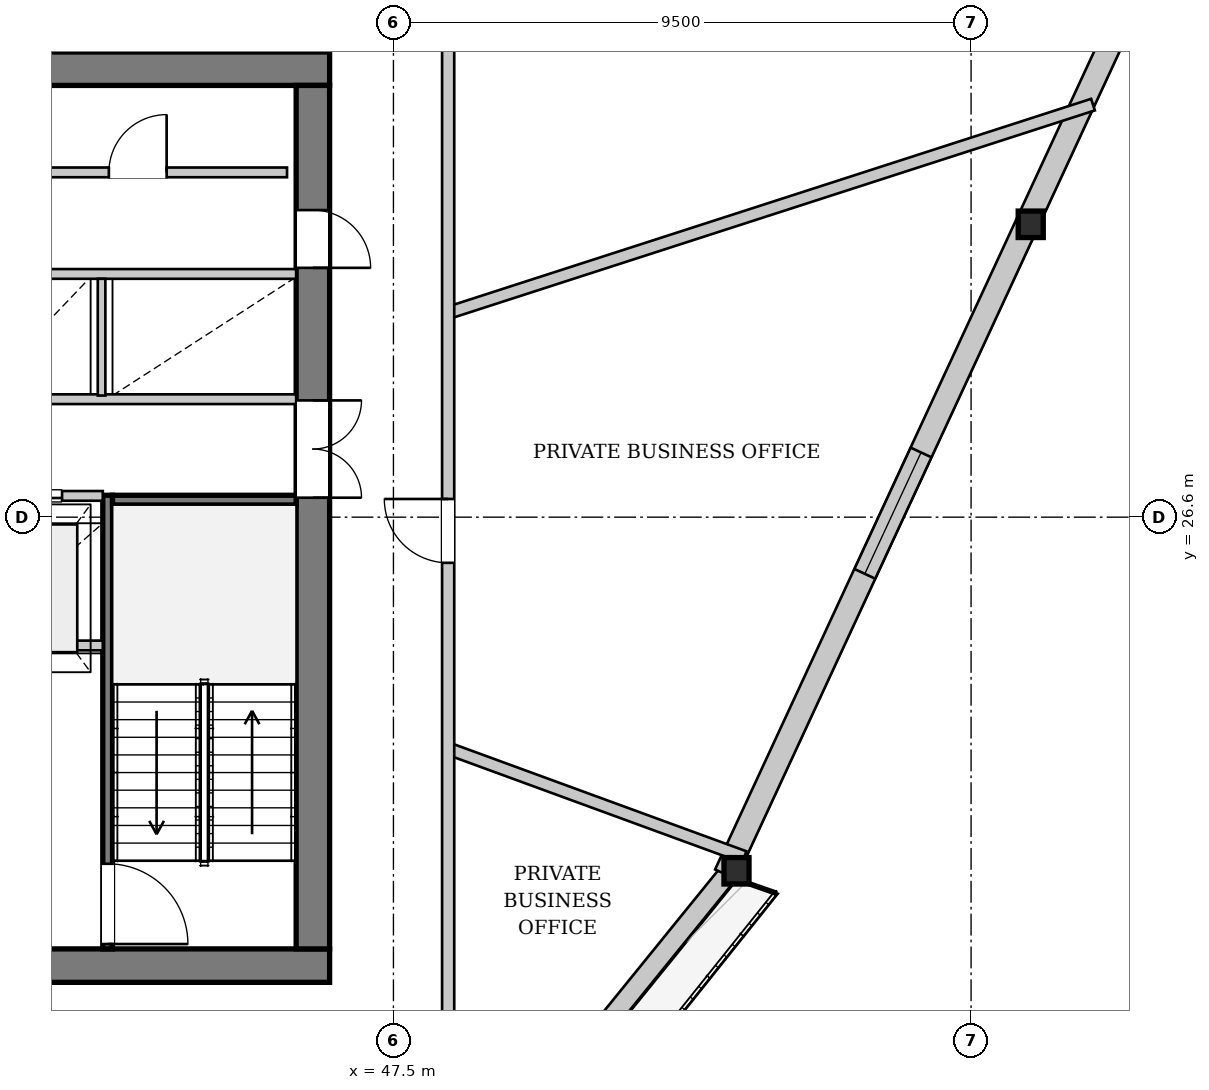
"""IFC4 building model, lengths in metres.
Left out: names, types, materials, properties, quantities, classifications, styles, units other than length and angle.
Written with IfcOpenShell. Run it as: python <this file> out.ifc"""

import sys

from ifc_helpers import new_model, si_unit, direction, frame, frame_2d, origin, origin_2d, place, context, subcontext, project, spatial, rectangle, i_section, extrude, source, transform, mapped, element, fill, save


model = new_model("IFC4")
c1 = context("Model", 3, precision=1e-05, world=origin(), true_north=direction((0.0, 1.0)))
c2 = subcontext(c1, "Body", "Model", "MODEL_VIEW")
j1 = project(units=[si_unit("LENGTHUNIT", "METRE"), si_unit("PLANEANGLEUNIT", "RADIAN")], contexts=[c1])
p1 = place(None, origin())
s1 = spatial("IfcSite", under=j1, at=p1, CompositionType="ELEMENT")
p2 = place(p1, origin())
s2 = spatial("IfcBuilding", under=s1, at=p2, CompositionType="ELEMENT")
p3 = place(p2, frame((0.0, 0.0, 175.0)))
s3 = spatial("IfcBuildingStorey", under=s2, at=p3, CompositionType="ELEMENT", Elevation=175.0)
m1 = source(origin(), c2, "Body", "SweptSolid", [
    extrude(i_section(OverallWidth=0.412, OverallDepth=0.435, WebThickness=0.031, FlangeThickness=0.05, at=origin_2d()), origin(), (0.0, 0.0, 1.0), 3.396),
])
p4 = place(p3, frame((53.135, 20.647, 0.0), z_axis=(0.00424121851, 0.081230117231, 0.996686349922), x_axis=(-0.998639713808, 0.052141365588, 0.0)))
e1 = element("IfcColumn", 1, at=p4, inside=s3, PredefinedType="COLUMN", context=c2, shape_type="MappedRepresentation", body=[
    mapped(m1, transform((0.0, 0.0, 0.0), x_axis=(1.0, 0.0, 0.0), y_axis=(0.0, 1.0, 0.0), z_axis=(0.0, 0.0, 1.0), scale=1.0)),
])
m2 = source(origin(), c2, "Body", "SweptSolid", [
    extrude(i_section(OverallWidth=0.412, OverallDepth=0.435, WebThickness=0.031, FlangeThickness=0.05, at=origin_2d()), origin(), (0.0, 0.0, 1.0), 3.404),
])
p5 = place(p3, frame((58.05, 31.252, 0.0), z_axis=(-0.0404553248, 0.096332448948, 0.994526734671), x_axis=(-0.92199681109, -0.387197469438, 0.0)))
e2 = element("IfcColumn", 2, at=p5, inside=s3, PredefinedType="COLUMN", context=c2, shape_type="MappedRepresentation", body=[
    mapped(m2, transform((0.0, 0.0, 0.0), x_axis=(1.0, 0.0, 0.0), y_axis=(0.0, 1.0, 0.0), z_axis=(0.0, 0.0, 1.0), scale=1.0)),
])
p6 = place(p3, frame((53.01, 20.748, 0.0), z_axis=(0.0, 0.0, 1.0), x_axis=(-0.629806386055, -0.776752158725, 0.0)))
e3 = element("IfcWall", 3, at=p6, inside=s3, PredefinedType="SOLIDWALL", context=c2, shape_type="SweptSolid", body=[
    extrude(rectangle(XDim=23.378, YDim=0.32, at=frame_2d((11.689, 0.0))), origin(), (0.0, 0.0, 1.0), 2.722),
])
p7 = place(p6, frame((6.731, 0.0, 0.0)))
e4 = element("IfcOpeningElement", 4, at=p7, cuts=e3, PredefinedType="OPENING", context=c2, shape_type="SweptSolid", body=[
    extrude(rectangle(XDim=1.5, YDim=2.3, at=frame_2d((0.75, 1.15))), frame((0.0, 0.17, 0.0), z_axis=(0.0, -1.0, 0.0), x_axis=(1.0, 0.0, 0.0)), (0.0, 0.0, 1.0), 0.34),
])
p8 = place(p6, frame((16.0, 0.0, 0.252)))
e5 = element("IfcOpeningElement", 5, at=p8, cuts=e3, PredefinedType="OPENING", context=c2, shape_type="SweptSolid", body=[
    extrude(rectangle(XDim=2.6, YDim=2.35, at=frame_2d((1.3, 1.175))), frame((0.0, 0.17, 0.0), z_axis=(0.0, -1.0, 0.0), x_axis=(1.0, 0.0, 0.0)), (0.0, 0.0, 1.0), 0.34),
])
p9 = place(p3, frame((62.792, 41.938, 0.0), z_axis=(0.0, 0.0, 1.0), x_axis=(-0.420482819505, -0.907300500662, 0.0)))
e6 = element("IfcWall", 6, at=p9, inside=s3, PredefinedType="SOLIDWALL", context=c2, shape_type="SweptSolid", body=[
    extrude(rectangle(XDim=23.378, YDim=0.38, at=frame_2d((11.689, 0.0))), origin(), (0.0, 0.0, 1.0), 2.722),
])
p10 = place(p9, frame((5.446, 0.0, 0.352)))
e7 = element("IfcOpeningElement", 7, at=p10, cuts=e6, PredefinedType="OPENING", context=c2, shape_type="SweptSolid", body=[
    extrude(rectangle(XDim=2.2, YDim=2.25, at=frame_2d((1.1, 1.125))), frame((0.0, 0.2, 0.0), z_axis=(0.0, -1.0, 0.0), x_axis=(1.0, 0.0, 0.0)), (0.0, 0.0, 1.0), 0.4),
])
p11 = place(p9, frame((15.732, 0.0, 0.352)))
e8 = element("IfcOpeningElement", 8, at=p11, cuts=e6, PredefinedType="OPENING", context=c2, shape_type="SweptSolid", body=[
    extrude(rectangle(XDim=2.2, YDim=2.25, at=frame_2d((1.1, 1.125))), frame((0.0, 0.2, 0.0), z_axis=(0.0, -1.0, 0.0), x_axis=(1.0, 0.0, 0.0)), (0.0, 0.0, 1.0), 0.4),
])
p12 = place(p3, frame((46.45, 19.225, 0.0), z_axis=(0.0, 0.0, 1.0), x_axis=(-1.0, 0.0, 0.0)))
e9 = element("IfcWall", 9, at=p12, inside=s3, PredefinedType="SHEAR", context=c2, shape_type="SweptSolid", body=[
    extrude(rectangle(XDim=16.9, YDim=0.55, at=frame_2d((8.45, 0.0))), origin(), (0.0, 0.0, 1.0), 3.33),
])
p13 = place(p12, frame((4.65, 0.0, 0.0)))
e10 = element("IfcOpeningElement", 10, at=p13, cuts=e9, PredefinedType="OPENING", context=c2, shape_type="SweptSolid", body=[
    extrude(rectangle(XDim=1.12, YDim=2.25, at=frame_2d((0.56, 1.125))), frame((0.0, 0.285, 0.0), z_axis=(0.0, -1.0, 0.0), x_axis=(1.0, 0.0, 0.0)), (0.0, 0.0, 1.0), 0.57),
])
p14 = place(p12, frame((11.15, 0.0, 0.0)))
e11 = element("IfcOpeningElement", 11, at=p14, cuts=e9, PredefinedType="OPENING", context=c2, shape_type="SweptSolid", body=[
    extrude(rectangle(XDim=1.12, YDim=2.25, at=frame_2d((0.56, 1.125))), frame((0.0, 0.285, 0.0), z_axis=(0.0, -1.0, 0.0), x_axis=(1.0, 0.0, 0.0)), (0.0, 0.0, 1.0), 0.57),
])
p15 = place(p3, frame((29.55, 33.975, 0.0), z_axis=(0.0, 0.0, 1.0), x_axis=(1.0, 0.0, 0.0)))
e12 = element("IfcWall", 12, at=p15, inside=s3, PredefinedType="SHEAR", context=c2, shape_type="SweptSolid", body=[
    extrude(rectangle(XDim=16.9, YDim=0.55, at=frame_2d((8.45, 0.0))), origin(), (0.0, 0.0, 1.0), 3.33),
])
p16 = place(p15, frame((1.55, 0.0, 0.0)))
e13 = element("IfcOpeningElement", 13, at=p16, cuts=e12, PredefinedType="OPENING", context=c2, shape_type="SweptSolid", body=[
    extrude(rectangle(XDim=0.95, YDim=2.1, at=frame_2d((0.475, 1.05))), frame((0.0, 0.285, 0.0), z_axis=(0.0, -1.0, 0.0), x_axis=(1.0, 0.0, 0.0)), (0.0, 0.0, 1.0), 0.57),
])
p17 = place(p15, frame((3.93, 0.0, 0.0)))
e14 = element("IfcOpeningElement", 14, at=p17, cuts=e12, PredefinedType="OPENING", context=c2, shape_type="SweptSolid", body=[
    extrude(rectangle(XDim=1.32, YDim=2.2, at=frame_2d((0.66, 1.1))), frame((0.0, 0.285, 0.0), z_axis=(0.0, -1.0, 0.0), x_axis=(1.0, 0.0, 0.0)), (0.0, 0.0, 1.0), 0.57),
])
p18 = place(p3, frame((46.175, 33.7, 0.0), z_axis=(0.0, 0.0, 1.0), x_axis=(0.0, -1.0, 0.0)))
e15 = element("IfcWall", 15, at=p18, inside=s3, PredefinedType="SHEAR", context=c2, shape_type="SweptSolid", body=[
    extrude(rectangle(XDim=14.2, YDim=0.55, at=frame_2d((7.1, 0.0))), origin(), (0.0, 0.0, 1.0), 3.33),
])
p19 = place(p18, frame((5.18, 0.0, 0.0)))
e16 = element("IfcOpeningElement", 16, at=p19, cuts=e15, PredefinedType="OPENING", context=c2, shape_type="SweptSolid", body=[
    extrude(rectangle(XDim=1.6, YDim=2.2, at=frame_2d((0.8, 1.1))), frame((0.0, 0.285, 0.0), z_axis=(0.0, -1.0, 0.0), x_axis=(1.0, 0.0, 0.0)), (0.0, 0.0, 1.0), 0.57),
])
p20 = place(p18, frame((2.05, 0.0, 0.0)))
e17 = element("IfcOpeningElement", 17, at=p20, cuts=e15, PredefinedType="OPENING", context=c2, shape_type="SweptSolid", body=[
    extrude(rectangle(XDim=0.95, YDim=2.1, at=frame_2d((0.475, 1.05))), frame((0.0, 0.285, 0.0), z_axis=(0.0, -1.0, 0.0), x_axis=(1.0, 0.0, 0.0)), (0.0, 0.0, 1.0), 0.57),
])
p21 = place(p3, frame((42.8, 26.96, 0.0), z_axis=(0.0, 0.0, 1.0), x_axis=(0.0, -1.0, 0.0)))
e18 = element("IfcWall", 18, at=p21, inside=s3, PredefinedType="PARTITIONING", context=c2, shape_type="SweptSolid", body=[
    extrude(rectangle(XDim=7.46, YDim=0.16, at=frame_2d((3.73, 0.0))), origin(), (0.0, 0.0, 1.0), 3.33),
])
p22 = place(p21, frame((6.06, 0.0, 0.0)))
e19 = element("IfcOpeningElement", 19, at=p22, cuts=e18, PredefinedType="OPENING", context=c2, shape_type="SweptSolid", body=[
    extrude(rectangle(XDim=1.32, YDim=2.2, at=frame_2d((0.66, 1.1))), frame((0.0, 0.09, 0.0), z_axis=(0.0, -1.0, 0.0), x_axis=(1.0, 0.0, 0.0)), (0.0, 0.0, 1.0), 0.18),
])
p23 = place(p3, frame((42.88, 26.88, 0.0), z_axis=(0.0, 0.0, 1.0), x_axis=(1.0, 0.0, 0.0)))
e20 = element("IfcWall", 20, at=p23, inside=s3, PredefinedType="PARTITIONING", context=c2, shape_type="SweptSolid", body=[
    extrude(rectangle(XDim=3.02, YDim=0.16, at=frame_2d((1.51, 0.0))), origin(), (0.0, 0.0, 1.0), 3.33),
])
p24 = place(p3, frame((33.28, 24.49, 0.0), z_axis=(0.0, 0.0, 1.0), x_axis=(1.0, 0.0, 0.0)))
e21 = element("IfcWall", 21, at=p24, inside=s3, PredefinedType="PARTITIONING", context=c2, shape_type="SweptSolid", body=[
    extrude(rectangle(XDim=9.44, YDim=0.16, at=frame_2d((4.72, 0.0))), origin(), (0.0, 0.0, 1.0), 3.33),
])
p25 = place(p3, frame((33.28, 26.95, 0.0), z_axis=(0.0, 0.0, 1.0), x_axis=(1.0, 0.0, 0.0)))
e22 = element("IfcWall", 22, at=p25, inside=s3, PredefinedType="PARTITIONING", context=c2, shape_type="SweptSolid", body=[
    extrude(rectangle(XDim=9.44, YDim=0.16, at=frame_2d((4.72, 0.0))), origin(), (0.0, 0.0, 1.0), 3.33),
])
p26 = place(p25, frame((1.2, 0.0, 0.0)))
e23 = element("IfcOpeningElement", 23, at=p26, cuts=e22, PredefinedType="OPENING", context=c2, shape_type="SweptSolid", body=[
    extrude(rectangle(XDim=0.95, YDim=2.1, at=frame_2d((0.475, 1.05))), frame((0.0, 0.09, 0.0), z_axis=(0.0, -1.0, 0.0), x_axis=(1.0, 0.0, 0.0)), (0.0, 0.0, 1.0), 0.18),
])
p27 = place(p25, frame((4.65, 0.0, 0.0)))
e24 = element("IfcOpeningElement", 24, at=p27, cuts=e22, PredefinedType="OPENING", context=c2, shape_type="SweptSolid", body=[
    extrude(rectangle(XDim=0.95, YDim=2.1, at=frame_2d((0.475, 1.05))), frame((0.0, 0.09, 0.0), z_axis=(0.0, -1.0, 0.0), x_axis=(1.0, 0.0, 0.0)), (0.0, 0.0, 1.0), 0.18),
])
p28 = place(p25, frame((7.67, 0.0, 0.0)))
e25 = element("IfcOpeningElement", 25, at=p28, cuts=e22, PredefinedType="OPENING", context=c2, shape_type="SweptSolid", body=[
    extrude(rectangle(XDim=1.1, YDim=2.2, at=frame_2d((0.55, 1.1))), frame((0.0, 0.09, 0.0), z_axis=(0.0, -1.0, 0.0), x_axis=(1.0, 0.0, 0.0)), (0.0, 0.0, 1.0), 0.18),
])
p29 = place(p3, frame((33.28, 28.54, 0.0), z_axis=(0.0, 0.0, 1.0), x_axis=(1.0, 0.0, 0.0)))
e26 = element("IfcWall", 26, at=p29, inside=s3, PredefinedType="PARTITIONING", context=c2, shape_type="SweptSolid", body=[
    extrude(rectangle(XDim=12.62, YDim=0.16, at=frame_2d((6.31, 0.0))), origin(), (0.0, 0.0, 1.0), 3.33),
])
p30 = place(p29, frame((0.26, 0.0, 0.0)))
e27 = element("IfcOpeningElement", 27, at=p30, cuts=e26, PredefinedType="OPENING", context=c2, shape_type="SweptSolid", body=[
    extrude(rectangle(XDim=1.1, YDim=2.2, at=frame_2d((0.55, 1.1))), frame((0.0, 0.09, 0.0), z_axis=(0.0, -1.0, 0.0), x_axis=(1.0, 0.0, 0.0)), (0.0, 0.0, 1.0), 0.18),
])
p31 = place(p29, frame((2.01, 0.0, 0.0)))
e28 = element("IfcOpeningElement", 28, at=p31, cuts=e26, PredefinedType="OPENING", context=c2, shape_type="SweptSolid", body=[
    extrude(rectangle(XDim=1.1, YDim=2.2, at=frame_2d((0.55, 1.1))), frame((0.0, 0.09, 0.0), z_axis=(0.0, -1.0, 0.0), x_axis=(1.0, 0.0, 0.0)), (0.0, 0.0, 1.0), 0.18),
])
p32 = place(p29, frame((3.76, 0.0, 0.0)))
e29 = element("IfcOpeningElement", 29, at=p32, cuts=e26, PredefinedType="OPENING", context=c2, shape_type="SweptSolid", body=[
    extrude(rectangle(XDim=1.1, YDim=2.2, at=frame_2d((0.55, 1.1))), frame((0.0, 0.09, 0.0), z_axis=(0.0, -1.0, 0.0), x_axis=(1.0, 0.0, 0.0)), (0.0, 0.0, 1.0), 0.18),
])
p33 = place(p3, frame((40.72, 30.6, 0.0), z_axis=(0.0, 0.0, 1.0), x_axis=(1.0, 0.0, 0.0)))
e30 = element("IfcWall", 30, at=p33, inside=s3, PredefinedType="PARTITIONING", context=c2, shape_type="SweptSolid", body=[
    extrude(rectangle(XDim=5.18, YDim=0.16, at=frame_2d((2.59, 0.0))), origin(), (0.0, 0.0, 1.0), 3.33),
])
p34 = place(p3, frame((42.7, 28.6, 0.0), z_axis=(0.0, 0.0, 1.0), x_axis=(0.0, 1.0, 0.0)))
e31 = element("IfcWall", 31, at=p34, inside=s3, PredefinedType="PARTITIONING", context=c2, shape_type="SweptSolid", body=[
    extrude(rectangle(XDim=1.92, YDim=0.125, at=frame_2d((0.96, 0.0))), origin(), (0.0, 0.0, 1.0), 3.33),
])
p35 = place(p3, frame((40.72, 32.27, 0.0), z_axis=(0.0, 0.0, 1.0), x_axis=(1.0, 0.0, 0.0)))
e32 = element("IfcWall", 32, at=p35, inside=s3, PredefinedType="PARTITIONING", context=c2, shape_type="SweptSolid", body=[
    extrude(rectangle(XDim=5.03, YDim=0.16, at=frame_2d((2.515, 0.0))), origin(), (0.0, 0.0, 1.0), 3.33),
])
p36 = place(p35, frame((2.1, 0.0, 0.0)))
e33 = element("IfcOpeningElement", 33, at=p36, cuts=e32, PredefinedType="OPENING", context=c2, shape_type="SweptSolid", body=[
    extrude(rectangle(XDim=0.95, YDim=2.1, at=frame_2d((0.475, 1.05))), frame((0.0, 0.09, 0.0), z_axis=(0.0, -1.0, 0.0), x_axis=(1.0, 0.0, 0.0)), (0.0, 0.0, 1.0), 0.18),
])
p37 = place(p3, frame((48.4, 22.794, 0.0), z_axis=(0.0, 0.0, 1.0), x_axis=(0.939100254498, -0.343643291805, 0.0)))
e34 = element("IfcWall", 34, at=p37, inside=s3, PredefinedType="PARTITIONING", context=c2, shape_type="SweptSolid", body=[
    extrude(rectangle(XDim=5.187, YDim=0.2, at=frame_2d((2.594, 0.0))), origin(), (0.0, 0.0, 1.0), 2.865),
])
p38 = place(p3, frame((48.4, 29.959, 0.0), z_axis=(0.0, 0.0, 1.0), x_axis=(0.951588584085, 0.307374635648, 0.0)))
e35 = element("IfcWall", 35, at=p38, inside=s3, PredefinedType="PARTITIONING", context=c2, shape_type="SweptSolid", body=[
    extrude(rectangle(XDim=11.145, YDim=0.2, at=frame_2d((5.572, 0.0))), origin(), (0.0, 0.0, 1.0), 3.33),
])
p39 = place(p3, frame((43.4, 34.25, 0.0), z_axis=(0.0, 0.0, 1.0), x_axis=(0.0, 1.0, 0.0)))
e36 = element("IfcWall", 36, at=p39, inside=s3, PredefinedType="PARTITIONING", context=c2, shape_type="SweptSolid", body=[
    extrude(rectangle(XDim=1.95, YDim=0.2, at=frame_2d((0.975, 0.0))), origin(), (0.0, 0.0, 1.0), 3.33),
])
p40 = place(p3, frame((48.4, 17.0, 0.0), z_axis=(0.0, 0.0, 1.0), x_axis=(0.0, 1.0, 0.0)))
e37 = element("IfcWall", 37, at=p40, inside=s3, PredefinedType="PARTITIONING", context=c2, shape_type="SweptSolid", body=[
    extrude(rectangle(XDim=19.2, YDim=0.2, at=frame_2d((9.6, 0.0))), origin(), (0.0, 0.0, 1.0), 3.33),
])
p41 = place(p40, frame((8.849, 0.0, 0.0)))
e38 = element("IfcOpeningElement", 38, at=p41, cuts=e37, PredefinedType="OPENING", context=c2, shape_type="SweptSolid", body=[
    extrude(rectangle(XDim=1.05, YDim=2.2, at=frame_2d((0.525, 1.1))), frame((0.0, 0.11, 0.0), z_axis=(0.0, -1.0, 0.0), x_axis=(1.0, 0.0, 0.0)), (0.0, 0.0, 1.0), 0.22),
])
m3 = source(origin(), c2, "Body", "SweptSolid", [
    extrude(rectangle(XDim=2.2, YDim=2.25, at=frame_2d((1.1, 1.125))), frame((0.0, 0.03, 0.0), z_axis=(0.0, -1.0, 0.0), x_axis=(1.0, 0.0, 0.0)), (0.0, 0.0, 1.0), 0.06),
])
p42 = place(p11, origin())
e39 = element("IfcWindow", 39, at=p42, inside=s3, PartitioningType="SINGLE_PANEL", PredefinedType="WINDOW", context=c2, shape_type="MappedRepresentation", body=[
    mapped(m3, transform((0.0, 0.0, 0.0), x_axis=(1.0, 0.0, 0.0), y_axis=(0.0, 1.0, 0.0), z_axis=(0.0, 0.0, 1.0), scale=1.0)),
])
fill(e8, e39)
m4 = source(origin(), c2, "Body", "SweptSolid", [
    extrude(rectangle(XDim=1.6, YDim=2.2, at=frame_2d((0.8, 1.1))), frame((0.0, 0.025, 0.0), z_axis=(0.0, -1.0, 0.0), x_axis=(1.0, 0.0, 0.0)), (0.0, 0.0, 1.0), 0.05),
])
p43 = place(p19, origin())
e40 = element("IfcDoor", 40, at=p43, inside=s3, OperationType="DOUBLE_DOOR_SINGLE_SWING", PredefinedType="DOOR", context=c2, shape_type="MappedRepresentation", body=[
    mapped(m4, transform((0.0, 0.0, 0.0), x_axis=(1.0, 0.0, 0.0), y_axis=(0.0, 1.0, 0.0), z_axis=(0.0, 0.0, 1.0), scale=1.0)),
])
fill(e16, e40)
m5 = source(origin(), c2, "Body", "SweptSolid", [
    extrude(rectangle(XDim=1.32, YDim=2.2, at=frame_2d((0.66, 1.1))), frame((0.0, 0.025, 0.0), z_axis=(0.0, -1.0, 0.0), x_axis=(1.0, 0.0, 0.0)), (0.0, 0.0, 1.0), 0.05),
])
p44 = place(p22, origin())
e41 = element("IfcDoor", 41, at=p44, inside=s3, OperationType="SINGLE_SWING_RIGHT", PredefinedType="DOOR", context=c2, shape_type="MappedRepresentation", body=[
    mapped(m5, transform((0.0, 0.0, 0.0), x_axis=(1.0, 0.0, 0.0), y_axis=(0.0, 1.0, 0.0), z_axis=(0.0, 0.0, 1.0), scale=1.0)),
])
fill(e19, e41)
m6 = source(origin(), c2, "Body", "SweptSolid", [
    extrude(rectangle(XDim=1.1, YDim=2.2, at=frame_2d((0.55, 1.1))), frame((0.0, 0.025, 0.0), z_axis=(0.0, -1.0, 0.0), x_axis=(1.0, 0.0, 0.0)), (0.0, 0.0, 1.0), 0.05),
])
p45 = place(p28, origin())
e42 = element("IfcDoor", 42, at=p45, inside=s3, OperationType="DOUBLE_DOOR_SLIDING", PredefinedType="DOOR", context=c2, shape_type="MappedRepresentation", body=[
    mapped(m6, transform((0.0, 0.0, 0.0), x_axis=(1.0, 0.0, 0.0), y_axis=(0.0, 1.0, 0.0), z_axis=(0.0, 0.0, 1.0), scale=1.0)),
])
fill(e25, e42)
m7 = source(origin(), c2, "Body", "SweptSolid", [
    extrude(rectangle(XDim=0.95, YDim=2.1, at=frame_2d((0.475, 1.05))), frame((0.0, 0.025, 0.0), z_axis=(0.0, -1.0, 0.0), x_axis=(1.0, 0.0, 0.0)), (0.0, 0.0, 1.0), 0.05),
])
p46 = place(p36, origin())
e43 = element("IfcDoor", 43, at=p46, inside=s3, OperationType="SINGLE_SWING_RIGHT", PredefinedType="DOOR", context=c2, shape_type="MappedRepresentation", body=[
    mapped(m7, transform((0.0, 0.0, 0.0), x_axis=(1.0, 0.0, 0.0), y_axis=(0.0, 1.0, 0.0), z_axis=(0.0, 0.0, 1.0), scale=1.0)),
])
fill(e33, e43)
p47 = place(p20, origin())
e44 = element("IfcDoor", 44, at=p47, inside=s3, OperationType="SINGLE_SWING_RIGHT", PredefinedType="DOOR", context=c2, shape_type="MappedRepresentation", body=[
    mapped(m7, transform((0.0, 0.0, 0.0), x_axis=(1.0, 0.0, 0.0), y_axis=(0.0, 1.0, 0.0), z_axis=(0.0, 0.0, 1.0), scale=1.0)),
])
fill(e17, e44)
m8 = source(origin(), c2, "Body", "SweptSolid", [
    extrude(rectangle(XDim=1.05, YDim=2.2, at=frame_2d((0.525, 1.1))), frame((0.0, 0.025, 0.0), z_axis=(0.0, -1.0, 0.0), x_axis=(1.0, 0.0, 0.0)), (0.0, 0.0, 1.0), 0.05),
])
p48 = place(p41, origin())
e45 = element("IfcDoor", 45, at=p48, inside=s3, OperationType="SINGLE_SWING_RIGHT", PredefinedType="DOOR", context=c2, shape_type="MappedRepresentation", body=[
    mapped(m8, transform((0.0, 0.0, 0.0), x_axis=(1.0, 0.0, 0.0), y_axis=(0.0, 1.0, 0.0), z_axis=(0.0, 0.0, 1.0), scale=1.0)),
])
fill(e38, e45)
save(model, sys.argv[1])
